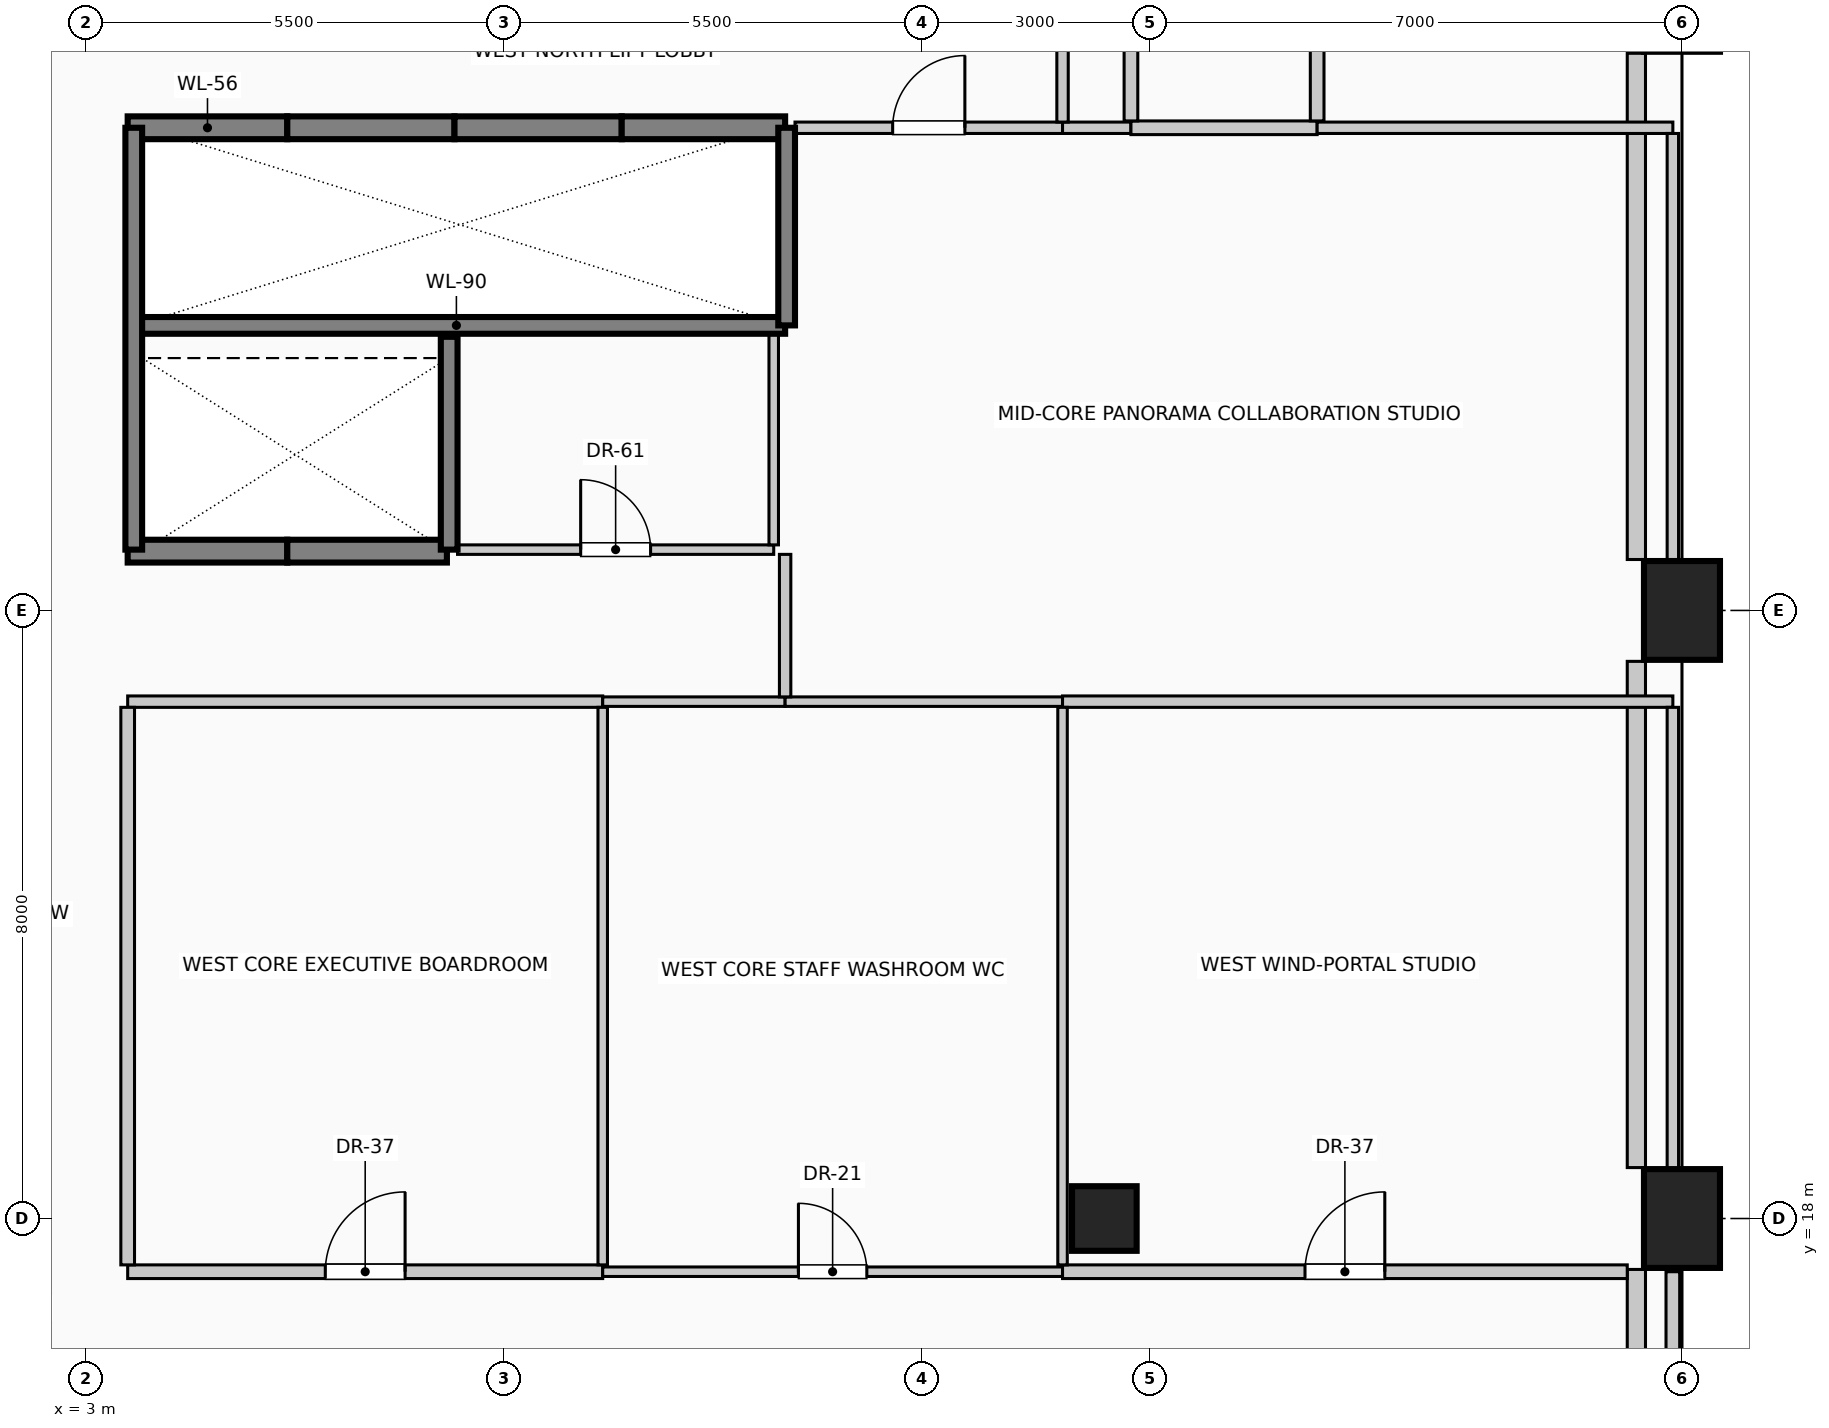
"""IFC4 building model, lengths in metres.
Left out: names, types, materials, properties, quantities, classifications, styles, units other than length and angle.
Written with IfcOpenShell. Run it as: python <this file> out.ifc"""

import sys

from ifc_helpers import new_model, si_unit, direction, frame, frame_2d, origin, origin_2d, place, context, subcontext, project, spatial, rectangle, circle, extrude, element, fill, save


model = new_model("IFC4")
c1 = context("Model", 3, precision=1e-05, world=origin(), true_north=direction((0.0, 1.0)))
c2 = subcontext(c1, "Body", "Model", "MODEL_VIEW")
j1 = project(units=[si_unit("LENGTHUNIT", "METRE"), si_unit("PLANEANGLEUNIT", "RADIAN")], contexts=[c1])
p1 = place(None, origin())
s1 = spatial("IfcSite", under=j1, at=p1, CompositionType="ELEMENT")
p2 = place(p1, origin())
s2 = spatial("IfcBuilding", under=s1, at=p2, CompositionType="ELEMENT")
p3 = place(p2, frame((0.0, 0.0, 198.6)))
s3 = spatial("IfcBuildingStorey", under=s2, at=p3, CompositionType="ELEMENT", Elevation=198.6)
for number, where, z_axis, x_axis in (
    (1, (24.0, 18.0, 0.0), (0.0, 0.0, 1.0), (1.0, 0.0, 0.0)),
    (2, (24.0, 26.0, 0.0), (0.0, 0.0, 1.0), (1.0, 0.0, 0.0)),
    (3, (24.0, 34.0, 0.0), (0.0, 0.0, 1.0), (1.0, 0.0, 0.0)),
):
    element("IfcColumn", number, at=place(p3, frame(where, z_axis=z_axis, x_axis=x_axis)), inside=s3, PredefinedType="COLUMN", context=c2, shape_type="SweptSolid", body=[
        extrude(rectangle(XDim=1.0, YDim=1.3, at=origin_2d()), origin(), (0.0, 0.0, 1.0), 4.0),
    ])
p4 = place(p3, frame((16.4, 18.0, 0.0), z_axis=(0.0, 0.0, 1.0), x_axis=(1.0, 0.0, 0.0)))
e4 = element("IfcColumn", 4, at=p4, inside=s3, PredefinedType="COLUMN", context=c2, shape_type="SweptSolid", body=[
    extrude(circle(Radius=0.425, at=origin_2d()), origin(), (0.0, 0.0, 1.0), 4.0),
])
for number, where, z_axis, x_axis in (
    (5, (23.4, 17.33, 0.0), (0.0, 0.0, 1.0), (0.0, -1.0, 0.0)),
    (6, (23.4, 25.33, 0.0), (0.0, 0.0, 1.0), (0.0, -1.0, 0.0)),
    (7, (23.4, 33.33, 0.0), (0.0, 0.0, 1.0), (0.0, -1.0, 0.0)),
):
    element("IfcWall", number, at=place(p3, frame(where, z_axis=z_axis, x_axis=x_axis)), inside=s3, PredefinedType="SOLIDWALL", context=c2, shape_type="SweptSolid", body=[
        extrude(rectangle(XDim=6.66, YDim=0.24, at=frame_2d((3.33, 0.0))), origin(), (0.0, 0.0, 1.0), 3.75),
    ])
p5 = place(p3, frame((3.55, 32.35, 0.0), z_axis=(0.0, 0.0, 1.0), x_axis=(1.0, 0.0, 0.0)))
e8 = element("IfcWall", 8, at=p5, inside=s3, PredefinedType="SOLIDWALL", context=c2, shape_type="SweptSolid", body=[
    extrude(rectangle(XDim=2.1, YDim=0.3, at=frame_2d((1.05, 0.0))), origin(), (0.0, 0.0, 1.0), 4.0),
])
p6 = place(p3, frame((5.65, 32.35, 0.0), z_axis=(0.0, 0.0, 1.0), x_axis=(1.0, 0.0, 0.0)))
e9 = element("IfcWall", 9, at=p6, inside=s3, PredefinedType="SOLIDWALL", context=c2, shape_type="SweptSolid", body=[
    extrude(rectangle(XDim=2.2, YDim=0.3, at=frame_2d((1.1, 0.0))), origin(), (0.0, 0.0, 1.0), 4.0),
])
p7 = place(p3, frame((7.85, 32.35, 0.0), z_axis=(0.0, 0.0, 1.0), x_axis=(1.0, 0.0, 0.0)))
e10 = element("IfcWall", 10, at=p7, inside=s3, PredefinedType="SOLIDWALL", context=c2, shape_type="SweptSolid", body=[
    extrude(rectangle(XDim=2.2, YDim=0.3, at=frame_2d((1.1, 0.0))), origin(), (0.0, 0.0, 1.0), 4.0),
])
p8 = place(p3, frame((10.05, 32.35, 0.0), z_axis=(0.0, 0.0, 1.0), x_axis=(1.0, 0.0, 0.0)))
e11 = element("IfcWall", 11, at=p8, inside=s3, PredefinedType="SOLIDWALL", context=c2, shape_type="SweptSolid", body=[
    extrude(rectangle(XDim=2.15, YDim=0.3, at=frame_2d((1.075, 0.0))), origin(), (0.0, 0.0, 1.0), 4.0),
])
p9 = place(p3, frame((5.65, 26.78, 0.0), z_axis=(0.0, 0.0, 1.0), x_axis=(-1.0, 0.0, 0.0)))
e12 = element("IfcWall", 12, at=p9, inside=s3, PredefinedType="SOLIDWALL", context=c2, shape_type="SweptSolid", body=[
    extrude(rectangle(XDim=2.1, YDim=0.3, at=frame_2d((1.05, 0.0))), origin(), (0.0, 0.0, 1.0), 4.0),
])
p10 = place(p3, frame((7.75, 26.78, 0.0), z_axis=(0.0, 0.0, 1.0), x_axis=(-1.0, 0.0, 0.0)))
e13 = element("IfcWall", 13, at=p10, inside=s3, PredefinedType="SOLIDWALL", context=c2, shape_type="SweptSolid", body=[
    extrude(rectangle(XDim=2.1, YDim=0.3, at=frame_2d((1.05, 0.0))), origin(), (0.0, 0.0, 1.0), 4.0),
])
p11 = place(p3, frame((3.55, 29.75, 0.0), z_axis=(0.0, 0.0, 1.0), x_axis=(1.0, 0.0, 0.0)))
e14 = element("IfcWall", 14, at=p11, inside=s3, PredefinedType="SOLIDWALL", context=c2, shape_type="SweptSolid", body=[
    extrude(rectangle(XDim=8.65, YDim=0.22, at=frame_2d((4.325, 0.0))), origin(), (0.0, 0.0, 1.0), 4.0),
])
p12 = place(p3, frame((3.63, 26.8, 0.0), z_axis=(0.0, 0.0, 1.0), x_axis=(0.0, 1.0, 0.0)))
e15 = element("IfcWall", 15, at=p12, inside=s3, PredefinedType="SOLIDWALL", context=c2, shape_type="SweptSolid", body=[
    extrude(rectangle(XDim=5.55, YDim=0.22, at=frame_2d((2.775, 0.0))), origin(), (0.0, 0.0, 1.0), 4.0),
])
p13 = place(p3, frame((7.78, 26.8, 0.0), z_axis=(0.0, 0.0, 1.0), x_axis=(0.0, 1.0, 0.0)))
e16 = element("IfcWall", 16, at=p13, inside=s3, PredefinedType="SOLIDWALL", context=c2, shape_type="SweptSolid", body=[
    extrude(rectangle(XDim=2.8, YDim=0.22, at=frame_2d((1.4, 0.0))), origin(), (0.0, 0.0, 1.0), 4.0),
])
p14 = place(p3, frame((12.22, 29.75, 0.0), z_axis=(0.0, 0.0, 1.0), x_axis=(0.0, 1.0, 0.0)))
e17 = element("IfcWall", 17, at=p14, inside=s3, PredefinedType="SOLIDWALL", context=c2, shape_type="SweptSolid", body=[
    extrude(rectangle(XDim=2.6, YDim=0.22, at=frame_2d((1.3, 0.0))), origin(), (0.0, 0.0, 1.0), 4.0),
])
p15 = place(p3, frame((3.55, 17.3, 0.0), z_axis=(0.0, 0.0, 1.0), x_axis=(1.0, 0.0, 0.0)))
e18 = element("IfcWall", 18, at=p15, inside=s3, PredefinedType="PARTITIONING", context=c2, shape_type="SweptSolid", body=[
    extrude(rectangle(XDim=6.25, YDim=0.18, at=frame_2d((3.125, 0.0))), origin(), (0.0, 0.0, 1.0), 3.75),
])
p16 = place(p15, frame((2.6, 0.0, 0.0)))
e19 = element("IfcOpeningElement", 19, at=p16, cuts=e18, PredefinedType="OPENING", context=c2, shape_type="SweptSolid", body=[
    extrude(rectangle(XDim=1.05, YDim=2.15, at=frame_2d((0.525, 1.075))), frame((0.0, 0.1, 0.0), z_axis=(0.0, -1.0, 0.0), x_axis=(1.0, 0.0, 0.0)), (0.0, 0.0, 1.0), 0.2),
])
p17 = place(p3, frame((9.8, 17.3, 0.0), z_axis=(0.0, 0.0, 1.0), x_axis=(1.0, 0.0, 0.0)))
e20 = element("IfcWall", 20, at=p17, inside=s3, PredefinedType="PARTITIONING", context=c2, shape_type="SweptSolid", body=[
    extrude(rectangle(XDim=6.05, YDim=0.125, at=frame_2d((3.025, 0.0))), origin(), (0.0, 0.0, 1.0), 3.75),
])
p18 = place(p17, frame((2.575, 0.0, 0.0)))
e21 = element("IfcOpeningElement", 21, at=p18, cuts=e20, PredefinedType="OPENING", context=c2, shape_type="SweptSolid", body=[
    extrude(rectangle(XDim=0.9, YDim=2.1, at=frame_2d((0.45, 1.05))), frame((0.0, 0.073, 0.0), z_axis=(0.0, -1.0, 0.0), x_axis=(1.0, 0.0, 0.0)), (0.0, 0.0, 1.0), 0.145),
])
p19 = place(p3, frame((15.85, 17.3, 0.0), z_axis=(0.0, 0.0, 1.0), x_axis=(1.0, 0.0, 0.0)))
e22 = element("IfcWall", 22, at=p19, inside=s3, PredefinedType="PARTITIONING", context=c2, shape_type="SweptSolid", body=[
    extrude(rectangle(XDim=7.43, YDim=0.18, at=frame_2d((3.715, 0.0))), origin(), (0.0, 0.0, 1.0), 3.75),
])
p20 = place(p19, frame((3.19, 0.0, 0.0)))
e23 = element("IfcOpeningElement", 23, at=p20, cuts=e22, PredefinedType="OPENING", context=c2, shape_type="SweptSolid", body=[
    extrude(rectangle(XDim=1.05, YDim=2.15, at=frame_2d((0.525, 1.075))), frame((0.0, 0.1, 0.0), z_axis=(0.0, -1.0, 0.0), x_axis=(1.0, 0.0, 0.0)), (0.0, 0.0, 1.0), 0.2),
])
p21 = place(p3, frame((3.55, 24.8, 0.0), z_axis=(0.0, 0.0, 1.0), x_axis=(1.0, 0.0, 0.0)))
e24 = element("IfcWall", 24, at=p21, inside=s3, PredefinedType="PARTITIONING", context=c2, shape_type="SweptSolid", body=[
    extrude(rectangle(XDim=6.25, YDim=0.15, at=frame_2d((3.125, 0.0))), origin(), (0.0, 0.0, 1.0), 3.75),
])
p22 = place(p3, frame((9.8, 24.8, 0.0), z_axis=(0.0, 0.0, 1.0), x_axis=(1.0, 0.0, 0.0)))
e25 = element("IfcWall", 25, at=p22, inside=s3, PredefinedType="PARTITIONING", context=c2, shape_type="SweptSolid", body=[
    extrude(rectangle(XDim=2.4, YDim=0.125, at=frame_2d((1.2, 0.0))), origin(), (0.0, 0.0, 1.0), 3.75),
])
p23 = place(p3, frame((12.2, 24.8, 0.0), z_axis=(0.0, 0.0, 1.0), x_axis=(1.0, 0.0, 0.0)))
e26 = element("IfcWall", 26, at=p23, inside=s3, PredefinedType="PARTITIONING", context=c2, shape_type="SweptSolid", body=[
    extrude(rectangle(XDim=3.65, YDim=0.125, at=frame_2d((1.825, 0.0))), origin(), (0.0, 0.0, 1.0), 3.75),
])
p24 = place(p3, frame((15.85, 24.8, 0.0), z_axis=(0.0, 0.0, 1.0), x_axis=(1.0, 0.0, 0.0)))
e27 = element("IfcWall", 27, at=p24, inside=s3, PredefinedType="PARTITIONING", context=c2, shape_type="SweptSolid", body=[
    extrude(rectangle(XDim=8.03, YDim=0.15, at=frame_2d((4.015, 0.0))), origin(), (0.0, 0.0, 1.0), 3.75),
])
p25 = place(p3, frame((7.89, 26.8, 0.0), z_axis=(0.0, 0.0, 1.0), x_axis=(1.0, 0.0, 0.0)))
e28 = element("IfcWall", 28, at=p25, inside=s3, PredefinedType="PARTITIONING", context=c2, shape_type="SweptSolid", body=[
    extrude(rectangle(XDim=4.16, YDim=0.125, at=frame_2d((2.08, 0.0))), origin(), (0.0, 0.0, 1.0), 3.75),
])
p26 = place(p25, frame((1.62, 0.0, 0.0)))
e29 = element("IfcOpeningElement", 29, at=p26, cuts=e28, PredefinedType="OPENING", context=c2, shape_type="SweptSolid", body=[
    extrude(rectangle(XDim=0.92, YDim=2.1, at=frame_2d((0.46, 1.05))), frame((0.0, 0.073, 0.0), z_axis=(0.0, -1.0, 0.0), x_axis=(1.0, 0.0, 0.0)), (0.0, 0.0, 1.0), 0.145),
])
p27 = place(p3, frame((12.33, 32.35, 0.0), z_axis=(0.0, 0.0, 1.0), x_axis=(1.0, 0.0, 0.0)))
e30 = element("IfcWall", 30, at=p27, inside=s3, PredefinedType="PARTITIONING", context=c2, shape_type="SweptSolid", body=[
    extrude(rectangle(XDim=3.52, YDim=0.15, at=frame_2d((1.76, 0.0))), origin(), (0.0, 0.0, 1.0), 3.75),
])
p28 = place(p27, frame((1.285, 0.0, 0.0)))
e31 = element("IfcOpeningElement", 31, at=p28, cuts=e30, PredefinedType="OPENING", context=c2, shape_type="SweptSolid", body=[
    extrude(rectangle(XDim=0.95, YDim=2.15, at=frame_2d((0.475, 1.075))), frame((0.0, 0.085, 0.0), z_axis=(0.0, -1.0, 0.0), x_axis=(1.0, 0.0, 0.0)), (0.0, 0.0, 1.0), 0.17),
])
p29 = place(p3, frame((15.85, 32.35, 0.0), z_axis=(0.0, 0.0, 1.0), x_axis=(1.0, 0.0, 0.0)))
e32 = element("IfcWall", 32, at=p29, inside=s3, PredefinedType="PARTITIONING", context=c2, shape_type="SweptSolid", body=[
    extrude(rectangle(XDim=0.9, YDim=0.15, at=frame_2d((0.45, 0.0))), origin(), (0.0, 0.0, 1.0), 3.75),
])
p30 = place(p3, frame((16.75, 32.35, 0.0), z_axis=(0.0, 0.0, 1.0), x_axis=(1.0, 0.0, 0.0)))
e33 = element("IfcWall", 33, at=p30, inside=s3, PredefinedType="PARTITIONING", context=c2, shape_type="SweptSolid", body=[
    extrude(rectangle(XDim=2.45, YDim=0.18, at=frame_2d((1.225, 0.0))), origin(), (0.0, 0.0, 1.0), 3.75),
])
p31 = place(p3, frame((19.2, 32.35, 0.0), z_axis=(0.0, 0.0, 1.0), x_axis=(1.0, 0.0, 0.0)))
e34 = element("IfcWall", 34, at=p31, inside=s3, PredefinedType="PARTITIONING", context=c2, shape_type="SweptSolid", body=[
    extrude(rectangle(XDim=4.68, YDim=0.15, at=frame_2d((2.34, 0.0))), origin(), (0.0, 0.0, 1.0), 3.75),
])
p32 = place(p3, frame((3.55, 17.39, 0.0), z_axis=(0.0, 0.0, 1.0), x_axis=(0.0, 1.0, 0.0)))
e35 = element("IfcWall", 35, at=p32, inside=s3, PredefinedType="PARTITIONING", context=c2, shape_type="SweptSolid", body=[
    extrude(rectangle(XDim=7.335, YDim=0.18, at=frame_2d((3.667, 0.0))), origin(), (0.0, 0.0, 1.0), 3.75),
])
p33 = place(p3, frame((9.8, 17.39, 0.0), z_axis=(0.0, 0.0, 1.0), x_axis=(0.0, 1.0, 0.0)))
e36 = element("IfcWall", 36, at=p33, inside=s3, PredefinedType="PARTITIONING", context=c2, shape_type="SweptSolid", body=[
    extrude(rectangle(XDim=7.335, YDim=0.125, at=frame_2d((3.667, 0.0))), origin(), (0.0, 0.0, 1.0), 3.75),
])
p34 = place(p3, frame((12.05, 26.863, 0.0), z_axis=(0.0, 0.0, 1.0), x_axis=(0.0, 1.0, 0.0)))
e37 = element("IfcWall", 37, at=p34, inside=s3, PredefinedType="PARTITIONING", context=c2, shape_type="SweptSolid", body=[
    extrude(rectangle(XDim=2.777, YDim=0.125, at=frame_2d((1.389, 0.0))), origin(), (0.0, 0.0, 1.0), 3.75),
])
p35 = place(p3, frame((12.2, 24.863, 0.0), z_axis=(0.0, 0.0, 1.0), x_axis=(0.0, 1.0, 0.0)))
e38 = element("IfcWall", 38, at=p35, inside=s3, PredefinedType="PARTITIONING", context=c2, shape_type="SweptSolid", body=[
    extrude(rectangle(XDim=1.875, YDim=0.15, at=frame_2d((0.938, 0.0))), origin(), (0.0, 0.0, 1.0), 3.75),
])
p36 = place(p3, frame((15.85, 17.39, 0.0), z_axis=(0.0, 0.0, 1.0), x_axis=(0.0, 1.0, 0.0)))
e39 = element("IfcWall", 39, at=p36, inside=s3, PredefinedType="PARTITIONING", context=c2, shape_type="SweptSolid", body=[
    extrude(rectangle(XDim=7.335, YDim=0.125, at=frame_2d((3.667, 0.0))), origin(), (0.0, 0.0, 1.0), 3.75),
])
p37 = place(p3, frame((15.85, 32.425, 0.0), z_axis=(0.0, 0.0, 1.0), x_axis=(0.0, 1.0, 0.0)))
e40 = element("IfcWall", 40, at=p37, inside=s3, PredefinedType="PARTITIONING", context=c2, shape_type="SweptSolid", body=[
    extrude(rectangle(XDim=1.725, YDim=0.15, at=frame_2d((0.862, 0.0))), origin(), (0.0, 0.0, 1.0), 3.75),
])
p38 = place(p3, frame((16.75, 32.44, 0.0), z_axis=(0.0, 0.0, 1.0), x_axis=(0.0, 1.0, 0.0)))
e41 = element("IfcWall", 41, at=p38, inside=s3, PredefinedType="PARTITIONING", context=c2, shape_type="SweptSolid", body=[
    extrude(rectangle(XDim=1.135, YDim=0.18, at=frame_2d((0.567, 0.0))), origin(), (0.0, 0.0, 1.0), 3.75),
])
p39 = place(p3, frame((19.2, 32.44, 0.0), z_axis=(0.0, 0.0, 1.0), x_axis=(0.0, 1.0, 0.0)))
e42 = element("IfcWall", 42, at=p39, inside=s3, PredefinedType="PARTITIONING", context=c2, shape_type="SweptSolid", body=[
    extrude(rectangle(XDim=1.82, YDim=0.18, at=frame_2d((0.91, 0.0))), origin(), (0.0, 0.0, 1.0), 3.75),
])
p40 = place(p3, frame((23.88, 15.29, 0.0), z_axis=(0.0, 0.0, 1.0), x_axis=(0.0, 1.0, 0.0)))
e43 = element("IfcWall", 43, at=p40, inside=s3, PredefinedType="PARTITIONING", context=c2, shape_type="SweptSolid", body=[
    extrude(rectangle(XDim=2.01, YDim=0.18, at=frame_2d((1.005, 0.0))), origin(), (0.0, 0.0, 1.0), 3.145),
])
p41 = place(p3, frame((23.88, 18.65, 0.0), z_axis=(0.0, 0.0, 1.0), x_axis=(0.0, 1.0, 0.0)))
e44 = element("IfcWall", 44, at=p41, inside=s3, PredefinedType="PARTITIONING", context=c2, shape_type="SweptSolid", body=[
    extrude(rectangle(XDim=6.075, YDim=0.15, at=frame_2d((3.038, 0.0))), origin(), (0.0, 0.0, 1.0), 3.145),
])
p42 = place(p3, frame((23.88, 26.65, 0.0), z_axis=(0.0, 0.0, 1.0), x_axis=(0.0, 1.0, 0.0)))
e45 = element("IfcWall", 45, at=p42, inside=s3, PredefinedType="PARTITIONING", context=c2, shape_type="SweptSolid", body=[
    extrude(rectangle(XDim=5.625, YDim=0.15, at=frame_2d((2.812, 0.0))), origin(), (0.0, 0.0, 1.0), 3.145),
])
p43 = place(p16, origin())
e46 = element("IfcDoor", 46, at=p43, inside=s3, OperationType="SINGLE_SWING_RIGHT", PredefinedType="DOOR", context=c2, shape_type="SweptSolid", body=[
    extrude(rectangle(XDim=1.05, YDim=2.15, at=frame_2d((0.525, 1.075))), frame((0.0, 0.025, 0.0), z_axis=(0.0, -1.0, 0.0), x_axis=(1.0, 0.0, 0.0)), (0.0, 0.0, 1.0), 0.05),
])
fill(e19, e46)
p44 = place(p18, origin())
e47 = element("IfcDoor", 47, at=p44, inside=s3, OperationType="SINGLE_SWING_LEFT", PredefinedType="DOOR", context=c2, shape_type="SweptSolid", body=[
    extrude(rectangle(XDim=0.9, YDim=2.1, at=frame_2d((0.45, 1.05))), frame((0.0, 0.025, 0.0), z_axis=(0.0, -1.0, 0.0), x_axis=(1.0, 0.0, 0.0)), (0.0, 0.0, 1.0), 0.05),
])
fill(e21, e47)
p45 = place(p20, origin())
e48 = element("IfcDoor", 48, at=p45, inside=s3, OperationType="SINGLE_SWING_RIGHT", PredefinedType="DOOR", context=c2, shape_type="SweptSolid", body=[
    extrude(rectangle(XDim=1.05, YDim=2.15, at=frame_2d((0.525, 1.075))), frame((0.0, 0.025, 0.0), z_axis=(0.0, -1.0, 0.0), x_axis=(1.0, 0.0, 0.0)), (0.0, 0.0, 1.0), 0.05),
])
fill(e23, e48)
p46 = place(p26, origin())
e49 = element("IfcDoor", 49, at=p46, inside=s3, OperationType="SINGLE_SWING_LEFT", PredefinedType="DOOR", context=c2, shape_type="SweptSolid", body=[
    extrude(rectangle(XDim=0.92, YDim=2.1, at=frame_2d((0.46, 1.05))), frame((0.0, 0.025, 0.0), z_axis=(0.0, -1.0, 0.0), x_axis=(1.0, 0.0, 0.0)), (0.0, 0.0, 1.0), 0.05),
])
fill(e29, e49)
p47 = place(p28, origin())
e50 = element("IfcDoor", 50, at=p47, inside=s3, OperationType="SINGLE_SWING_RIGHT", PredefinedType="DOOR", context=c2, shape_type="SweptSolid", body=[
    extrude(rectangle(XDim=0.95, YDim=2.15, at=frame_2d((0.475, 1.075))), frame((0.0, 0.025, 0.0), z_axis=(0.0, -1.0, 0.0), x_axis=(1.0, 0.0, 0.0)), (0.0, 0.0, 1.0), 0.05),
])
fill(e31, e50)
save(model, sys.argv[1])
